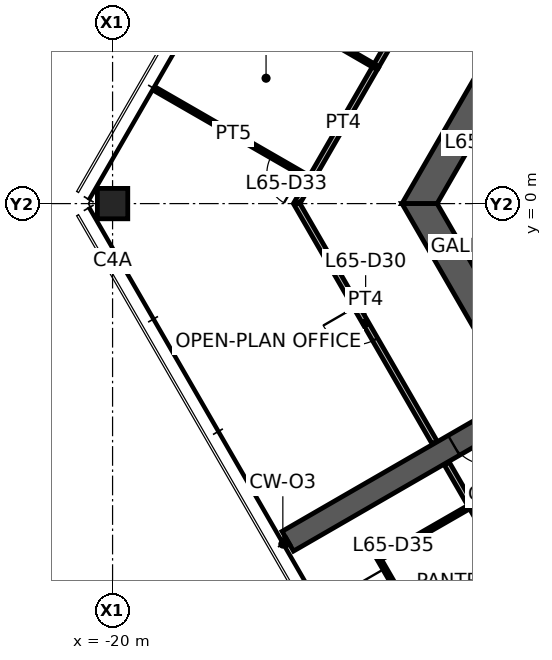
"""IFC4 building model, lengths in metres.
Left out: names, types, materials, properties, quantities, classifications, styles, units other than length and angle.
Written with IfcOpenShell. Run it as: python <this file> out.ifc"""

import sys

from ifc_helpers import new_model, si_unit, direction, frame, frame_2d, origin, origin_2d, place, context, subcontext, project, spatial, polyline, rectangle, hollow_rectangle, outline, extrude, element, fill, save


model = new_model("IFC4")
c1 = context("Model", 3, precision=1e-05, world=origin(), true_north=direction((0.0, 1.0)))
c2 = subcontext(c1, "Body", "Model", "MODEL_VIEW")
j1 = project(units=[si_unit("LENGTHUNIT", "METRE"), si_unit("PLANEANGLEUNIT", "RADIAN")], contexts=[c1])
p1 = place(None, origin())
s1 = spatial("IfcSite", under=j1, at=p1, CompositionType="ELEMENT")
p2 = place(p1, origin())
s2 = spatial("IfcBuilding", under=s1, at=p2, CompositionType="ELEMENT")
p3 = place(p2, frame((0.0, 0.0, 259.6)))
s3 = spatial("IfcBuildingStorey", under=s2, at=p3, CompositionType="ELEMENT", Elevation=259.6)
p4 = place(p3, frame((-20.0, 0.0, 0.0), z_axis=(0.0, 0.0, 1.0), x_axis=(1.0, 0.0, 0.0)))
e1 = element("IfcColumn", 1, at=p4, inside=s3, PredefinedType="COLUMN", context=c2, shape_type="SweptSolid", body=[
    extrude(hollow_rectangle(XDim=0.8, YDim=0.8, WallThickness=0.04, at=origin_2d()), origin(), (0.0, 0.0, 1.0), 3.9),
])
p5 = place(p3, frame((-5.961, 10.325, 0.0), z_axis=(0.0, 0.0, 1.0), x_axis=(-0.500004296715, -0.866022923061, 0.0)))
e2 = element("IfcWall", 2, at=p5, inside=s3, PredefinedType="SHEAR", context=c2, shape_type="SweptSolid", body=[
    extrude(outline(polyline([(-0.231, -0.4), (4.494, -0.4), (5.494, -0.4), (12.153, -0.4), (11.691, 0.4), (5.494, 0.4), (4.494, 0.4), (0.231, 0.4), (-0.231, -0.4)])), origin(), (0.0, 0.0, 1.0), 3.9),
])
p6 = place(p5, frame((4.494, 0.0, 0.0)))
e3 = element("IfcOpeningElement", 3, at=p6, cuts=e2, PredefinedType="OPENING", context=c2, shape_type="SweptSolid", body=[
    extrude(rectangle(XDim=1.0, YDim=2.1, at=frame_2d((0.5, 1.05))), frame((0.0, 0.41, 0.0), z_axis=(0.0, -1.0, 0.0), x_axis=(1.0, 0.0, 0.0)), (0.0, 0.0, 1.0), 0.82),
])
p7 = place(p3, frame((-11.922, 0.0, 0.0), z_axis=(0.0, 0.0, 1.0), x_axis=(0.500004296715, -0.866022923061, 0.0)))
e4 = element("IfcWall", 4, at=p7, inside=s3, PredefinedType="SHEAR", context=c2, shape_type="SweptSolid", body=[
    extrude(outline(polyline([(-0.231, -0.4), (6.281, -0.4), (7.081, -0.4), (12.153, -0.4), (11.691, 0.4), (7.081, 0.4), (6.281, 0.4), (0.231, 0.4), (-0.231, -0.4)])), origin(), (0.0, 0.0, 1.0), 3.9),
])
p8 = place(p7, frame((6.281, 0.0, 0.0)))
e5 = element("IfcOpeningElement", 5, at=p8, cuts=e4, PredefinedType="OPENING", context=c2, shape_type="SweptSolid", body=[
    extrude(rectangle(XDim=0.8, YDim=2.1, at=frame_2d((0.4, 1.05))), frame((0.0, 0.41, 0.0), z_axis=(0.0, -1.0, 0.0), x_axis=(1.0, 0.0, 0.0)), (0.0, 0.0, 1.0), 0.82),
])
p9 = place(p3, frame((-9.288, -5.363, 0.0), z_axis=(0.0, 0.0, 1.0), x_axis=(-0.866027473358, -0.499996415376, 0.0)))
e6 = element("IfcWall", 6, at=p9, inside=s3, PredefinedType="SHEAR", context=c2, shape_type="SweptSolid", body=[
    extrude(rectangle(XDim=7.045, YDim=0.6, at=frame_2d((3.523, 0.0))), origin(), (0.0, 0.0, 1.0), 3.9),
])
p10 = place(p9, frame((1.0, 0.0, 0.0)))
e7 = element("IfcOpeningElement", 7, at=p10, cuts=e6, PredefinedType="OPENING", context=c2, shape_type="SweptSolid", body=[
    extrude(rectangle(XDim=1.0, YDim=2.1, at=frame_2d((0.5, 1.05))), frame((0.0, 0.31, 0.0), z_axis=(0.0, -1.0, 0.0), x_axis=(1.0, 0.0, 0.0)), (0.0, 0.0, 1.0), 0.62),
])
p11 = place(p3, frame((-14.785, 0.642, 0.0), z_axis=(0.0, 0.0, 1.0), x_axis=(0.500032973541, 0.866006365664, 0.0)))
e8 = element("IfcWall", 8, at=p11, inside=s3, PredefinedType="PARTITIONING", context=c2, shape_type="SweptSolid", body=[
    extrude(rectangle(XDim=3.426, YDim=0.15, at=frame_2d((1.713, 0.0))), origin(), (0.0, 0.0, 1.0), 2.95),
])
p12 = place(p3, frame((-15.156, 0.0, 0.0), z_axis=(0.0, 0.0, 1.0), x_axis=(0.500088105676, 0.865974529972, 0.0)))
e9 = element("IfcWall", 9, at=p12, inside=s3, PredefinedType="PARTITIONING", context=c2, shape_type="SweptSolid", body=[
    extrude(rectangle(XDim=0.751, YDim=0.15, at=frame_2d((0.375, 0.0))), origin(), (0.0, 0.0, 1.0), 2.95),
])
p13 = place(p3, frame((-11.527, -6.285, 0.0), z_axis=(0.0, 0.0, 1.0), x_axis=(-0.500002959843, 0.866023694911, 0.0)))
e10 = element("IfcWall", 10, at=p13, inside=s3, PredefinedType="PARTITIONING", context=c2, shape_type="SweptSolid", body=[
    extrude(rectangle(XDim=7.258, YDim=0.15, at=frame_2d((3.629, 0.0))), origin(), (0.0, 0.0, 1.0), 2.95),
])
p14 = place(p13, frame((3.129, 0.0, 0.0)))
e11 = element("IfcOpeningElement", 11, at=p14, cuts=e10, PredefinedType="OPENING", context=c2, shape_type="SweptSolid", body=[
    extrude(rectangle(XDim=1.0, YDim=2.1, at=frame_2d((0.5, 1.05))), frame((0.0, 0.085, 0.0), z_axis=(0.0, -1.0, 0.0), x_axis=(1.0, 0.0, 0.0)), (0.0, 0.0, 1.0), 0.17),
])
p15 = place(p3, frame((-13.077, 3.601, 0.0), z_axis=(0.0, 0.0, 1.0), x_axis=(0.500004632818, 0.866022729009, 0.0)))
e12 = element("IfcWall", 12, at=p15, inside=s3, PredefinedType="PARTITIONING", context=c2, shape_type="SweptSolid", body=[
    extrude(rectangle(XDim=6.84, YDim=0.15, at=frame_2d((3.42, 0.0))), origin(), (0.0, 0.0, 1.0), 2.95),
])
p16 = place(p15, frame((2.92, 0.0, 0.0)))
e13 = element("IfcOpeningElement", 13, at=p16, cuts=e12, PredefinedType="OPENING", context=c2, shape_type="SweptSolid", body=[
    extrude(rectangle(XDim=1.0, YDim=2.1, at=frame_2d((0.5, 1.05))), frame((0.0, 0.085, 0.0), z_axis=(0.0, -1.0, 0.0), x_axis=(1.0, 0.0, 0.0)), (0.0, 0.0, 1.0), 0.17),
])
p17 = place(p3, frame((-14.78, 0.651, 0.0), z_axis=(0.0, 0.0, 1.0), x_axis=(-0.866504138439, 0.499169888984, 0.0)))
e14 = element("IfcWall", 14, at=p17, inside=s3, PredefinedType="PARTITIONING", context=c2, shape_type="SweptSolid", body=[
    extrude(rectangle(XDim=4.706, YDim=0.1, at=frame_2d((2.353, 0.0))), origin(), (0.0, 0.0, 1.0), 2.95),
])
p18 = place(p17, frame((0.3, 0.0, 0.0)))
e15 = element("IfcOpeningElement", 15, at=p18, cuts=e14, PredefinedType="OPENING", context=c2, shape_type="SweptSolid", body=[
    extrude(rectangle(XDim=0.9, YDim=2.1, at=frame_2d((0.45, 1.05))), frame((0.0, 0.06, 0.0), z_axis=(0.0, -1.0, 0.0), x_axis=(1.0, 0.0, 0.0)), (0.0, 0.0, 1.0), 0.12),
])
p19 = place(p3, frame((-17.123, 5.942, 0.0), z_axis=(0.0, 0.0, 1.0), x_axis=(0.86551803214, -0.500877765568, 0.0)))
e16 = element("IfcWall", 16, at=p19, inside=s3, PredefinedType="PARTITIONING", context=c2, shape_type="SweptSolid", body=[
    extrude(rectangle(XDim=4.675, YDim=0.1, at=frame_2d((2.338, 0.0))), origin(), (0.0, 0.0, 1.0), 2.95),
])
p20 = place(p3, frame((-9.064, -10.551, 0.0), z_axis=(0.0, 0.0, 1.0), x_axis=(-0.499977562641, 0.866038357612, 0.0)))
e17 = element("IfcWall", 17, at=p20, inside=s3, PredefinedType="PARTITIONING", context=c2, shape_type="SweptSolid", body=[
    extrude(rectangle(XDim=3.01, YDim=0.15, at=frame_2d((1.505, 0.0))), origin(), (0.0, 0.0, 1.0), 2.95),
])
p21 = place(p3, frame((-10.564, -7.952, 0.0), z_axis=(0.0, 0.0, 1.0), x_axis=(-0.500084415177, 0.865976661173, 0.0)))
e18 = element("IfcWall", 18, at=p21, inside=s3, PredefinedType="PARTITIONING", context=c2, shape_type="SweptSolid", body=[
    extrude(rectangle(XDim=1.284, YDim=0.15, at=frame_2d((0.642, 0.0))), origin(), (0.0, 0.0, 1.0), 2.95),
])
p22 = place(p3, frame((-12.991, -9.348, 0.0), z_axis=(0.0, 0.0, 1.0), x_axis=(0.866817750494, 0.498625097071, 0.0)))
e19 = element("IfcWall", 19, at=p22, inside=s3, PredefinedType="PARTITIONING", context=c2, shape_type="SweptSolid", body=[
    extrude(rectangle(XDim=2.8, YDim=0.1, at=frame_2d((1.4, 0.0))), origin(), (0.0, 0.0, 1.0), 2.95),
])
p23 = place(p3, frame((-11.491, -11.946, 0.0), z_axis=(0.0, 0.0, 1.0), x_axis=(-0.499990139034, 0.866031096941, 0.0)))
e20 = element("IfcWall", 20, at=p23, inside=s3, PredefinedType="PARTITIONING", context=c2, shape_type="SweptSolid", body=[
    extrude(rectangle(XDim=3.0, YDim=0.1, at=frame_2d((1.5, 0.0))), origin(), (0.0, 0.0, 1.0), 2.95),
])
p24 = place(p23, frame((1.8, 0.0, 0.0)))
e21 = element("IfcOpeningElement", 21, at=p24, cuts=e20, PredefinedType="OPENING", context=c2, shape_type="SweptSolid", body=[
    extrude(rectangle(XDim=0.9, YDim=2.1, at=frame_2d((0.45, 1.05))), frame((0.0, 0.06, 0.0), z_axis=(0.0, -1.0, 0.0), x_axis=(1.0, 0.0, 0.0)), (0.0, 0.0, 1.0), 0.12),
])
p25 = place(p3, frame((-15.39, -8.885, 0.0), z_axis=(0.0, 0.0, 1.0), x_axis=(-0.866472036435, -0.499225610396, 0.0)))
e22 = element("IfcWall", 22, at=p25, inside=s3, PredefinedType="PARTITIONING", context=c2, shape_type="SweptSolid", body=[
    extrude(rectangle(XDim=0.085, YDim=0.175, at=frame_2d((0.042, 0.0))), origin(), (0.0, 0.0, 1.0), 3.9),
])
p26 = place(p10, origin())
e23 = element("IfcDoor", 23, at=p26, inside=s3, OperationType="SINGLE_SWING_LEFT", PredefinedType="DOOR", context=c2, shape_type="SweptSolid", body=[
    extrude(rectangle(XDim=1.0, YDim=2.1, at=frame_2d((0.5, 1.05))), frame((0.0, 0.025, 0.0), z_axis=(0.0, -1.0, 0.0), x_axis=(1.0, 0.0, 0.0)), (0.0, 0.0, 1.0), 0.05),
])
fill(e7, e23)
p27 = place(p14, origin())
e24 = element("IfcDoor", 24, at=p27, inside=s3, OperationType="SINGLE_SWING_RIGHT", PredefinedType="DOOR", context=c2, shape_type="SweptSolid", body=[
    extrude(rectangle(XDim=1.0, YDim=2.1, at=frame_2d((0.5, 1.05))), frame((0.0, 0.025, 0.0), z_axis=(0.0, -1.0, 0.0), x_axis=(1.0, 0.0, 0.0)), (0.0, 0.0, 1.0), 0.05),
])
fill(e11, e24)
p28 = place(p18, origin())
e25 = element("IfcDoor", 25, at=p28, inside=s3, OperationType="SINGLE_SWING_LEFT", PredefinedType="DOOR", context=c2, shape_type="SweptSolid", body=[
    extrude(rectangle(XDim=0.9, YDim=2.1, at=frame_2d((0.45, 1.05))), frame((0.0, 0.025, 0.0), z_axis=(0.0, -1.0, 0.0), x_axis=(1.0, 0.0, 0.0)), (0.0, 0.0, 1.0), 0.05),
])
fill(e15, e25)
p29 = place(p24, origin())
e26 = element("IfcDoor", 26, at=p29, inside=s3, OperationType="SINGLE_SWING_RIGHT", PredefinedType="DOOR", context=c2, shape_type="SweptSolid", body=[
    extrude(rectangle(XDim=0.9, YDim=2.1, at=frame_2d((0.45, 1.05))), frame((0.0, 0.025, 0.0), z_axis=(0.0, -1.0, 0.0), x_axis=(1.0, 0.0, 0.0)), (0.0, 0.0, 1.0), 0.05),
])
fill(e21, e26)
save(model, sys.argv[1])
